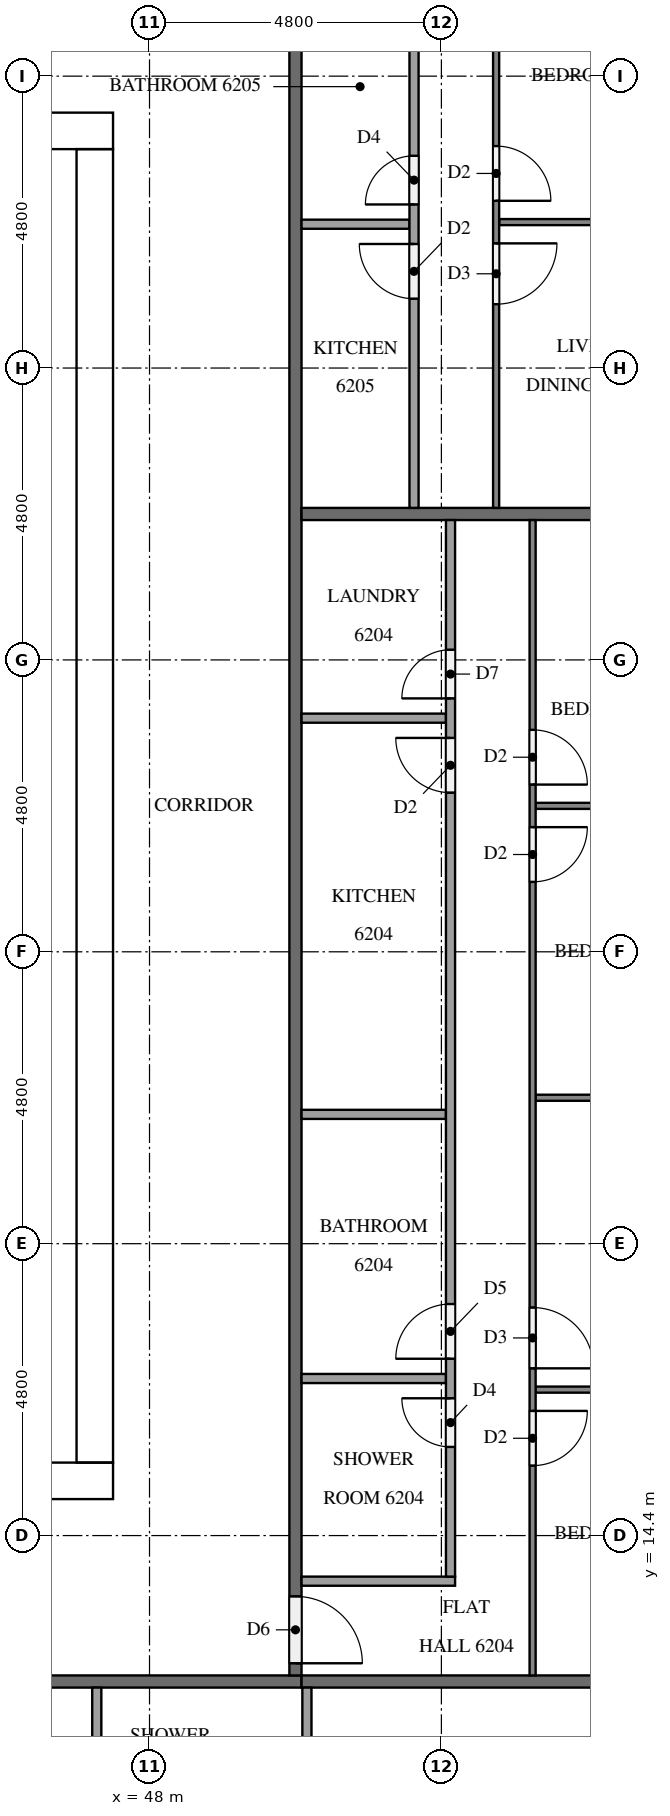
"""IFC4 building model, lengths in metres.
Left out: names, types, materials, properties, quantities, classifications, styles, units other than length and angle.
Written with IfcOpenShell. Run it as: python <this file> out.ifc"""

import sys

from ifc_helpers import new_model, si_unit, direction, frame, frame_2d, origin, place, context, subcontext, project, spatial, rectangle, extrude, element, fill, save


model = new_model("IFC4")
c1 = context("Model", 3, precision=1e-05, world=origin(), true_north=direction((0.0, 1.0)))
c2 = subcontext(c1, "Body", "Model", "MODEL_VIEW")
j1 = project(units=[si_unit("LENGTHUNIT", "METRE"), si_unit("PLANEANGLEUNIT", "RADIAN")], contexts=[c1])
p1 = place(None, origin())
s1 = spatial("IfcSite", under=j1, at=p1, CompositionType="ELEMENT")
p2 = place(p1, origin())
s2 = spatial("IfcBuilding", under=s1, at=p2, CompositionType="ELEMENT")
p3 = place(p2, frame((0.0, 0.0, 238.7)))
s3 = spatial("IfcBuildingStorey", under=s2, at=p3, CompositionType="ELEMENT", Elevation=238.7)
p4 = place(p3, frame((15.0, 15.3, 0.0), z_axis=(0.0, 0.0, 1.0), x_axis=(1.0, 0.0, 0.0)))
e1 = element("IfcWall", 1, at=p4, inside=s3, PredefinedType="SHEAR", context=c2, shape_type="SweptSolid", body=[
    extrude(rectangle(XDim=32.4, YDim=0.6, at=frame_2d((16.2, 0.0))), origin(), (0.0, 0.0, 1.0), 3.2),
])
p5 = place(p4, frame((15.3, 0.0, 0.0)))
e2 = element("IfcOpeningElement", 2, at=p5, cuts=e1, PredefinedType="OPENING", context=c2, shape_type="SweptSolid", body=[
    extrude(rectangle(XDim=1.8, YDim=2.1, at=frame_2d((0.9, 1.05))), frame((0.0, 0.31, 0.0), z_axis=(0.0, -1.0, 0.0), x_axis=(1.0, 0.0, 0.0)), (0.0, 0.0, 1.0), 0.62),
])
p6 = place(p3, frame((15.0, 37.5, 0.0), z_axis=(0.0, 0.0, 1.0), x_axis=(1.0, 0.0, 0.0)))
e3 = element("IfcWall", 3, at=p6, inside=s3, PredefinedType="SHEAR", context=c2, shape_type="SweptSolid", body=[
    extrude(rectangle(XDim=32.4, YDim=0.6, at=frame_2d((16.2, 0.0))), origin(), (0.0, 0.0, 1.0), 3.2),
])
p7 = place(p6, frame((15.3, 0.0, 0.0)))
e4 = element("IfcOpeningElement", 4, at=p7, cuts=e3, PredefinedType="OPENING", context=c2, shape_type="SweptSolid", body=[
    extrude(rectangle(XDim=1.8, YDim=2.1, at=frame_2d((0.9, 1.05))), frame((0.0, 0.31, 0.0), z_axis=(0.0, -1.0, 0.0), x_axis=(1.0, 0.0, 0.0)), (0.0, 0.0, 1.0), 0.62),
])
p8 = place(p6, frame((1.25, 0.0, 0.0)))
e5 = element("IfcOpeningElement", 5, at=p8, cuts=e3, PredefinedType="OPENING", context=c2, shape_type="SweptSolid", body=[
    extrude(rectangle(XDim=1.0, YDim=2.1, at=frame_2d((0.5, 1.05))), frame((0.0, 0.31, 0.0), z_axis=(0.0, -1.0, 0.0), x_axis=(1.0, 0.0, 0.0)), (0.0, 0.0, 1.0), 0.62),
])
p9 = place(p6, frame((4.988, 0.0, 0.0)))
e6 = element("IfcOpeningElement", 6, at=p9, cuts=e3, PredefinedType="OPENING", context=c2, shape_type="SweptSolid", body=[
    extrude(rectangle(XDim=1.0, YDim=2.1, at=frame_2d((0.5, 1.05))), frame((0.0, 0.31, 0.0), z_axis=(0.0, -1.0, 0.0), x_axis=(1.0, 0.0, 0.0)), (0.0, 0.0, 1.0), 0.62),
])
p10 = place(p3, frame((47.1, 15.6, 0.0), z_axis=(0.0, 0.0, 1.0), x_axis=(0.0, 1.0, 0.0)))
e7 = element("IfcWall", 7, at=p10, inside=s3, PredefinedType="SHEAR", context=c2, shape_type="SweptSolid", body=[
    extrude(rectangle(XDim=21.6, YDim=0.6, at=frame_2d((10.8, 0.0))), origin(), (0.0, 0.0, 1.0), 3.2),
])
p11 = place(p10, frame((10.5, 0.0, 0.0)))
e8 = element("IfcOpeningElement", 8, at=p11, cuts=e7, PredefinedType="OPENING", context=c2, shape_type="SweptSolid", body=[
    extrude(rectangle(XDim=1.2, YDim=2.1, at=frame_2d((0.6, 1.05))), frame((0.0, 0.31, 0.0), z_axis=(0.0, -1.0, 0.0), x_axis=(1.0, 0.0, 0.0)), (0.0, 0.0, 1.0), 0.62),
])
p12 = place(p3, frame((50.5, 12.0, 0.0), z_axis=(0.0, 0.0, 1.0), x_axis=(-1.0, 0.0, 0.0)))
e9 = element("IfcWall", 9, at=p12, inside=s3, PredefinedType="PARTITIONING", context=c2, shape_type="SweptSolid", body=[
    extrude(rectangle(XDim=38.6, YDim=0.2, at=frame_2d((19.3, 0.0))), origin(), (0.0, 0.0, 1.0), 3.2),
])
p13 = place(p12, frame((37.1, 0.0, 0.0)))
e10 = element("IfcOpeningElement", 10, at=p13, cuts=e9, PredefinedType="OPENING", context=c2, shape_type="SweptSolid", body=[
    extrude(rectangle(XDim=1.1, YDim=2.1, at=frame_2d((0.55, 1.05))), frame((0.0, 0.11, 0.0), z_axis=(0.0, -1.0, 0.0), x_axis=(1.0, 0.0, 0.0)), (0.0, 0.0, 1.0), 0.22),
])
p14 = place(p12, frame((17.95, 0.0, 0.0)))
e11 = element("IfcOpeningElement", 11, at=p14, cuts=e9, PredefinedType="OPENING", context=c2, shape_type="SweptSolid", body=[
    extrude(rectangle(XDim=1.0, YDim=2.1, at=frame_2d((0.5, 1.05))), frame((0.0, 0.11, 0.0), z_axis=(0.0, -1.0, 0.0), x_axis=(1.0, 0.0, 0.0)), (0.0, 0.0, 1.0), 0.22),
])
p15 = place(p12, frame((8.35, 0.0, 0.0)))
e12 = element("IfcOpeningElement", 12, at=p15, cuts=e9, PredefinedType="OPENING", context=c2, shape_type="SweptSolid", body=[
    extrude(rectangle(XDim=1.0, YDim=2.1, at=frame_2d((0.5, 1.05))), frame((0.0, 0.11, 0.0), z_axis=(0.0, -1.0, 0.0), x_axis=(1.0, 0.0, 0.0)), (0.0, 0.0, 1.0), 0.22),
])
p16 = place(p3, frame((50.4, 40.7, 0.0), z_axis=(0.0, 0.0, 1.0), x_axis=(0.0, -1.0, 0.0)))
e13 = element("IfcWall", 13, at=p16, inside=s3, PredefinedType="PARTITIONING", context=c2, shape_type="SweptSolid", body=[
    extrude(rectangle(XDim=28.6, YDim=0.2, at=frame_2d((14.3, 0.0))), origin(), (0.0, 0.0, 1.0), 3.2),
])
p17 = place(p16, frame((27.3, 0.0, 0.0)))
e14 = element("IfcOpeningElement", 14, at=p17, cuts=e13, PredefinedType="OPENING", context=c2, shape_type="SweptSolid", body=[
    extrude(rectangle(XDim=1.1, YDim=2.1, at=frame_2d((0.55, 1.05))), frame((0.0, 0.11, 0.0), z_axis=(0.0, -1.0, 0.0), x_axis=(1.0, 0.0, 0.0)), (0.0, 0.0, 1.0), 0.22),
])
p18 = place(p16, frame((0.25, 0.0, 0.0)))
e15 = element("IfcOpeningElement", 15, at=p18, cuts=e13, PredefinedType="OPENING", context=c2, shape_type="SweptSolid", body=[
    extrude(rectangle(XDim=1.0, YDim=2.1, at=frame_2d((0.5, 1.05))), frame((0.0, 0.11, 0.0), z_axis=(0.0, -1.0, 0.0), x_axis=(1.0, 0.0, 0.0)), (0.0, 0.0, 1.0), 0.22),
])
for number, where, z_axis, x_axis in (
    (16, (50.5, 12.0, 0.0), (0.0, 0.0, 1.0), (1.0, 0.0, 0.0)),
    (17, (50.5, 31.2, 0.0), (0.0, 0.0, 1.0), (1.0, 0.0, 0.0)),
):
    element("IfcWall", number, at=place(p3, frame(where, z_axis=z_axis, x_axis=x_axis)), inside=s3, PredefinedType="PARTITIONING", context=c2, shape_type="SweptSolid", body=[
        extrude(rectangle(XDim=7.0, YDim=0.2, at=frame_2d((3.5, 0.0))), origin(), (0.0, 0.0, 1.0), 3.2),
    ])
for number, where, z_axis, x_axis in (
    (18, (47.133, 11.9, 0.0), (0.0, 0.0, 1.0), (0.0, -1.0, 0.0)),
    (19, (50.588, 11.9, 0.0), (0.0, 0.0, 1.0), (0.0, -1.0, 0.0)),
):
    element("IfcWall", number, at=place(p3, frame(where, z_axis=z_axis, x_axis=x_axis)), inside=s3, PredefinedType="PARTITIONING", context=c2, shape_type="SweptSolid", body=[
        extrude(rectangle(XDim=2.075, YDim=0.15, at=frame_2d((1.038, 0.0))), origin(), (0.0, 0.0, 1.0), 3.2),
    ])
for number, where, z_axis, x_axis in (
    (20, (54.35, 16.8, 0.0), (0.0, 0.0, 1.0), (1.0, 0.0, 0.0)),
    (21, (54.35, 21.6, 0.0), (0.0, 0.0, 1.0), (1.0, 0.0, 0.0)),
    (22, (54.35, 26.4, 0.0), (0.0, 0.0, 1.0), (1.0, 0.0, 0.0)),
):
    element("IfcWall", number, at=place(p3, frame(where, z_axis=z_axis, x_axis=x_axis)), inside=s3, PredefinedType="PARTITIONING", context=c2, shape_type="SweptSolid", body=[
        extrude(rectangle(XDim=3.15, YDim=0.1, at=frame_2d((1.575, 0.0))), origin(), (0.0, 0.0, 1.0), 3.2),
    ])
p19 = place(p3, frame((54.3, 31.1, 0.0), z_axis=(0.0, 0.0, 1.0), x_axis=(0.0, -1.0, 0.0)))
e23 = element("IfcWall", 23, at=p19, inside=s3, PredefinedType="PARTITIONING", context=c2, shape_type="SweptSolid", body=[
    extrude(rectangle(XDim=19.0, YDim=0.1, at=frame_2d((9.5, 0.0))), origin(), (0.0, 0.0, 1.0), 3.2),
])
p20 = place(p19, frame((14.65, 0.0, 0.0)))
e24 = element("IfcOpeningElement", 24, at=p20, cuts=e23, PredefinedType="OPENING", context=c2, shape_type="SweptSolid", body=[
    extrude(rectangle(XDim=0.9, YDim=2.1, at=frame_2d((0.45, 1.05))), frame((0.0, 0.06, 0.0), z_axis=(0.0, -1.0, 0.0), x_axis=(1.0, 0.0, 0.0)), (0.0, 0.0, 1.0), 0.12),
])
p21 = place(p19, frame((12.95, 0.0, 0.0)))
e25 = element("IfcOpeningElement", 25, at=p21, cuts=e23, PredefinedType="OPENING", context=c2, shape_type="SweptSolid", body=[
    extrude(rectangle(XDim=1.0, YDim=2.1, at=frame_2d((0.5, 1.05))), frame((0.0, 0.06, 0.0), z_axis=(0.0, -1.0, 0.0), x_axis=(1.0, 0.0, 0.0)), (0.0, 0.0, 1.0), 0.12),
])
p22 = place(p19, frame((5.05, 0.0, 0.0)))
e26 = element("IfcOpeningElement", 26, at=p22, cuts=e23, PredefinedType="OPENING", context=c2, shape_type="SweptSolid", body=[
    extrude(rectangle(XDim=0.9, YDim=2.1, at=frame_2d((0.45, 1.05))), frame((0.0, 0.06, 0.0), z_axis=(0.0, -1.0, 0.0), x_axis=(1.0, 0.0, 0.0)), (0.0, 0.0, 1.0), 0.12),
])
p23 = place(p19, frame((3.45, 0.0, 0.0)))
e27 = element("IfcOpeningElement", 27, at=p23, cuts=e23, PredefinedType="OPENING", context=c2, shape_type="SweptSolid", body=[
    extrude(rectangle(XDim=0.9, YDim=2.1, at=frame_2d((0.45, 1.05))), frame((0.0, 0.06, 0.0), z_axis=(0.0, -1.0, 0.0), x_axis=(1.0, 0.0, 0.0)), (0.0, 0.0, 1.0), 0.12),
])
for number, where, z_axis, x_axis in (
    (28, (50.5, 16.983, 0.0), (0.0, 0.0, 1.0), (1.0, 0.0, 0.0)),
    (29, (50.5, 21.327, 0.0), (0.0, 0.0, 1.0), (1.0, 0.0, 0.0)),
    (30, (50.5, 27.842, 0.0), (0.0, 0.0, 1.0), (1.0, 0.0, 0.0)),
):
    element("IfcWall", number, at=place(p3, frame(where, z_axis=z_axis, x_axis=x_axis)), inside=s3, PredefinedType="PARTITIONING", context=c2, shape_type="SweptSolid", body=[
        extrude(rectangle(XDim=2.375, YDim=0.15, at=frame_2d((1.188, 0.0))), origin(), (0.0, 0.0, 1.0), 3.2),
    ])
p24 = place(p3, frame((50.5, 13.65, 0.0), z_axis=(0.0, 0.0, 1.0), x_axis=(1.0, 0.0, 0.0)))
e31 = element("IfcWall", 31, at=p24, inside=s3, PredefinedType="PARTITIONING", context=c2, shape_type="SweptSolid", body=[
    extrude(rectangle(XDim=2.525, YDim=0.15, at=frame_2d((1.262, 0.0))), origin(), (0.0, 0.0, 1.0), 3.2),
])
p25 = place(p3, frame((52.95, 13.725, 0.0), z_axis=(0.0, 0.0, 1.0), x_axis=(0.0, 1.0, 0.0)))
e32 = element("IfcWall", 32, at=p25, inside=s3, PredefinedType="PARTITIONING", context=c2, shape_type="SweptSolid", body=[
    extrude(rectangle(XDim=17.375, YDim=0.15, at=frame_2d((8.688, 0.0))), origin(), (0.0, 0.0, 1.0), 3.2),
])
p26 = place(p25, frame((2.133, 0.0, 0.0)))
e33 = element("IfcOpeningElement", 33, at=p26, cuts=e32, PredefinedType="OPENING", context=c2, shape_type="SweptSolid", body=[
    extrude(rectangle(XDim=0.8, YDim=2.1, at=frame_2d((0.4, 1.05))), frame((0.0, 0.085, 0.0), z_axis=(0.0, -1.0, 0.0), x_axis=(1.0, 0.0, 0.0)), (0.0, 0.0, 1.0), 0.17),
])
p27 = place(p25, frame((3.583, 0.0, 0.0)))
e34 = element("IfcOpeningElement", 34, at=p27, cuts=e32, PredefinedType="OPENING", context=c2, shape_type="SweptSolid", body=[
    extrude(rectangle(XDim=0.9, YDim=2.1, at=frame_2d((0.45, 1.05))), frame((0.0, 0.085, 0.0), z_axis=(0.0, -1.0, 0.0), x_axis=(1.0, 0.0, 0.0)), (0.0, 0.0, 1.0), 0.17),
])
p28 = place(p25, frame((12.892, 0.0, 0.0)))
e35 = element("IfcOpeningElement", 35, at=p28, cuts=e32, PredefinedType="OPENING", context=c2, shape_type="SweptSolid", body=[
    extrude(rectangle(XDim=0.9, YDim=2.1, at=frame_2d((0.45, 1.05))), frame((0.0, 0.085, 0.0), z_axis=(0.0, -1.0, 0.0), x_axis=(1.0, 0.0, 0.0)), (0.0, 0.0, 1.0), 0.17),
])
p29 = place(p25, frame((14.442, 0.0, 0.0)))
e36 = element("IfcOpeningElement", 36, at=p29, cuts=e32, PredefinedType="OPENING", context=c2, shape_type="SweptSolid", body=[
    extrude(rectangle(XDim=0.8, YDim=2.1, at=frame_2d((0.4, 1.05))), frame((0.0, 0.085, 0.0), z_axis=(0.0, -1.0, 0.0), x_axis=(1.0, 0.0, 0.0)), (0.0, 0.0, 1.0), 0.17),
])
p30 = place(p3, frame((53.75, 36.0, 0.0), z_axis=(0.0, 0.0, 1.0), x_axis=(1.0, 0.0, 0.0)))
e37 = element("IfcWall", 37, at=p30, inside=s3, PredefinedType="PARTITIONING", context=c2, shape_type="SweptSolid", body=[
    extrude(rectangle(XDim=3.75, YDim=0.1, at=frame_2d((1.875, 0.0))), origin(), (0.0, 0.0, 1.0), 3.2),
])
p31 = place(p3, frame((53.7, 40.7, 0.0), z_axis=(0.0, 0.0, 1.0), x_axis=(0.0, -1.0, 0.0)))
e38 = element("IfcWall", 38, at=p31, inside=s3, PredefinedType="PARTITIONING", context=c2, shape_type="SweptSolid", body=[
    extrude(rectangle(XDim=9.4, YDim=0.1, at=frame_2d((4.7, 0.0))), origin(), (0.0, 0.0, 1.0), 3.2),
])
p32 = place(p31, frame((3.45, 0.0, 0.0)))
e39 = element("IfcOpeningElement", 39, at=p32, cuts=e38, PredefinedType="OPENING", context=c2, shape_type="SweptSolid", body=[
    extrude(rectangle(XDim=0.9, YDim=2.1, at=frame_2d((0.45, 1.05))), frame((0.0, 0.06, 0.0), z_axis=(0.0, -1.0, 0.0), x_axis=(1.0, 0.0, 0.0)), (0.0, 0.0, 1.0), 0.12),
])
p33 = place(p31, frame((5.05, 0.0, 0.0)))
e40 = element("IfcOpeningElement", 40, at=p33, cuts=e38, PredefinedType="OPENING", context=c2, shape_type="SweptSolid", body=[
    extrude(rectangle(XDim=1.0, YDim=2.1, at=frame_2d((0.5, 1.05))), frame((0.0, 0.06, 0.0), z_axis=(0.0, -1.0, 0.0), x_axis=(1.0, 0.0, 0.0)), (0.0, 0.0, 1.0), 0.12),
])
p34 = place(p3, frame((50.5, 35.965, 0.0), z_axis=(0.0, 0.0, 1.0), x_axis=(1.0, 0.0, 0.0)))
e41 = element("IfcWall", 41, at=p34, inside=s3, PredefinedType="PARTITIONING", context=c2, shape_type="SweptSolid", body=[
    extrude(rectangle(XDim=1.775, YDim=0.15, at=frame_2d((0.887, 0.0))), origin(), (0.0, 0.0, 1.0), 3.2),
])
p35 = place(p3, frame((52.35, 31.3, 0.0), z_axis=(0.0, 0.0, 1.0), x_axis=(0.0, 1.0, 0.0)))
e42 = element("IfcWall", 42, at=p35, inside=s3, PredefinedType="PARTITIONING", context=c2, shape_type="SweptSolid", body=[
    extrude(rectangle(XDim=7.775, YDim=0.15, at=frame_2d((3.887, 0.0))), origin(), (0.0, 0.0, 1.0), 3.2),
])
p36 = place(p35, frame((4.99, 0.0, 0.0)))
e43 = element("IfcOpeningElement", 43, at=p36, cuts=e42, PredefinedType="OPENING", context=c2, shape_type="SweptSolid", body=[
    extrude(rectangle(XDim=0.8, YDim=2.1, at=frame_2d((0.4, 1.05))), frame((0.0, 0.085, 0.0), z_axis=(0.0, -1.0, 0.0), x_axis=(1.0, 0.0, 0.0)), (0.0, 0.0, 1.0), 0.17),
])
p37 = place(p35, frame((3.44, 0.0, 0.0)))
e44 = element("IfcOpeningElement", 44, at=p37, cuts=e42, PredefinedType="OPENING", context=c2, shape_type="SweptSolid", body=[
    extrude(rectangle(XDim=0.9, YDim=2.1, at=frame_2d((0.45, 1.05))), frame((0.0, 0.085, 0.0), z_axis=(0.0, -1.0, 0.0), x_axis=(1.0, 0.0, 0.0)), (0.0, 0.0, 1.0), 0.17),
])
p38 = place(p11, origin())
e45 = element("IfcDoor", 45, at=p38, inside=s3, OperationType="SINGLE_SWING_RIGHT", PredefinedType="DOOR", context=c2, shape_type="SweptSolid", body=[
    extrude(rectangle(XDim=1.2, YDim=2.1, at=frame_2d((0.6, 1.05))), frame((0.0, 0.025, 0.0), z_axis=(0.0, -1.0, 0.0), x_axis=(1.0, 0.0, 0.0)), (0.0, 0.0, 1.0), 0.05),
])
fill(e8, e45)
p39 = place(p17, origin())
e46 = element("IfcDoor", 46, at=p39, inside=s3, OperationType="SINGLE_SWING_RIGHT", PredefinedType="DOOR", context=c2, shape_type="SweptSolid", body=[
    extrude(rectangle(XDim=1.1, YDim=2.1, at=frame_2d((0.55, 1.05))), frame((0.0, 0.025, 0.0), z_axis=(0.0, -1.0, 0.0), x_axis=(1.0, 0.0, 0.0)), (0.0, 0.0, 1.0), 0.05),
])
fill(e14, e46)
p40 = place(p20, origin())
e47 = element("IfcDoor", 47, at=p40, inside=s3, OperationType="SINGLE_SWING_LEFT", PredefinedType="DOOR", context=c2, shape_type="SweptSolid", body=[
    extrude(rectangle(XDim=0.9, YDim=2.1, at=frame_2d((0.45, 1.05))), frame((0.0, 0.025, 0.0), z_axis=(0.0, -1.0, 0.0), x_axis=(1.0, 0.0, 0.0)), (0.0, 0.0, 1.0), 0.05),
])
fill(e24, e47)
p41 = place(p21, origin())
e48 = element("IfcDoor", 48, at=p41, inside=s3, OperationType="SINGLE_SWING_RIGHT", PredefinedType="DOOR", context=c2, shape_type="SweptSolid", body=[
    extrude(rectangle(XDim=1.0, YDim=2.1, at=frame_2d((0.5, 1.05))), frame((0.0, 0.025, 0.0), z_axis=(0.0, -1.0, 0.0), x_axis=(1.0, 0.0, 0.0)), (0.0, 0.0, 1.0), 0.05),
])
fill(e25, e48)
p42 = place(p22, origin())
e49 = element("IfcDoor", 49, at=p42, inside=s3, OperationType="SINGLE_SWING_LEFT", PredefinedType="DOOR", context=c2, shape_type="SweptSolid", body=[
    extrude(rectangle(XDim=0.9, YDim=2.1, at=frame_2d((0.45, 1.05))), frame((0.0, 0.025, 0.0), z_axis=(0.0, -1.0, 0.0), x_axis=(1.0, 0.0, 0.0)), (0.0, 0.0, 1.0), 0.05),
])
fill(e26, e49)
p43 = place(p23, origin())
e50 = element("IfcDoor", 50, at=p43, inside=s3, OperationType="SINGLE_SWING_RIGHT", PredefinedType="DOOR", context=c2, shape_type="SweptSolid", body=[
    extrude(rectangle(XDim=0.9, YDim=2.1, at=frame_2d((0.45, 1.05))), frame((0.0, 0.025, 0.0), z_axis=(0.0, -1.0, 0.0), x_axis=(1.0, 0.0, 0.0)), (0.0, 0.0, 1.0), 0.05),
])
fill(e27, e50)
p44 = place(p26, origin())
e51 = element("IfcDoor", 51, at=p44, inside=s3, OperationType="SINGLE_SWING_RIGHT", PredefinedType="DOOR", context=c2, shape_type="SweptSolid", body=[
    extrude(rectangle(XDim=0.8, YDim=2.1, at=frame_2d((0.4, 1.05))), frame((0.0, 0.025, 0.0), z_axis=(0.0, -1.0, 0.0), x_axis=(1.0, 0.0, 0.0)), (0.0, 0.0, 1.0), 0.05),
])
fill(e33, e51)
p45 = place(p27, origin())
e52 = element("IfcDoor", 52, at=p45, inside=s3, OperationType="SINGLE_SWING_LEFT", PredefinedType="DOOR", context=c2, shape_type="SweptSolid", body=[
    extrude(rectangle(XDim=0.9, YDim=2.1, at=frame_2d((0.45, 1.05))), frame((0.0, 0.025, 0.0), z_axis=(0.0, -1.0, 0.0), x_axis=(1.0, 0.0, 0.0)), (0.0, 0.0, 1.0), 0.05),
])
fill(e34, e52)
p46 = place(p28, origin())
e53 = element("IfcDoor", 53, at=p46, inside=s3, OperationType="SINGLE_SWING_RIGHT", PredefinedType="DOOR", context=c2, shape_type="SweptSolid", body=[
    extrude(rectangle(XDim=0.9, YDim=2.1, at=frame_2d((0.45, 1.05))), frame((0.0, 0.025, 0.0), z_axis=(0.0, -1.0, 0.0), x_axis=(1.0, 0.0, 0.0)), (0.0, 0.0, 1.0), 0.05),
])
fill(e35, e53)
p47 = place(p29, origin())
e54 = element("IfcDoor", 54, at=p47, inside=s3, OperationType="SINGLE_SWING_LEFT", PredefinedType="DOOR", context=c2, shape_type="SweptSolid", body=[
    extrude(rectangle(XDim=0.8, YDim=2.1, at=frame_2d((0.4, 1.05))), frame((0.0, 0.025, 0.0), z_axis=(0.0, -1.0, 0.0), x_axis=(1.0, 0.0, 0.0)), (0.0, 0.0, 1.0), 0.05),
])
fill(e36, e54)
p48 = place(p32, origin())
e55 = element("IfcDoor", 55, at=p48, inside=s3, OperationType="SINGLE_SWING_RIGHT", PredefinedType="DOOR", context=c2, shape_type="SweptSolid", body=[
    extrude(rectangle(XDim=0.9, YDim=2.1, at=frame_2d((0.45, 1.05))), frame((0.0, 0.025, 0.0), z_axis=(0.0, -1.0, 0.0), x_axis=(1.0, 0.0, 0.0)), (0.0, 0.0, 1.0), 0.05),
])
fill(e39, e55)
p49 = place(p33, origin())
e56 = element("IfcDoor", 56, at=p49, inside=s3, OperationType="SINGLE_SWING_LEFT", PredefinedType="DOOR", context=c2, shape_type="SweptSolid", body=[
    extrude(rectangle(XDim=1.0, YDim=2.1, at=frame_2d((0.5, 1.05))), frame((0.0, 0.025, 0.0), z_axis=(0.0, -1.0, 0.0), x_axis=(1.0, 0.0, 0.0)), (0.0, 0.0, 1.0), 0.05),
])
fill(e40, e56)
p50 = place(p36, origin())
e57 = element("IfcDoor", 57, at=p50, inside=s3, OperationType="SINGLE_SWING_LEFT", PredefinedType="DOOR", context=c2, shape_type="SweptSolid", body=[
    extrude(rectangle(XDim=0.8, YDim=2.1, at=frame_2d((0.4, 1.05))), frame((0.0, 0.025, 0.0), z_axis=(0.0, -1.0, 0.0), x_axis=(1.0, 0.0, 0.0)), (0.0, 0.0, 1.0), 0.05),
])
fill(e43, e57)
p51 = place(p37, origin())
e58 = element("IfcDoor", 58, at=p51, inside=s3, OperationType="SINGLE_SWING_RIGHT", PredefinedType="DOOR", context=c2, shape_type="SweptSolid", body=[
    extrude(rectangle(XDim=0.9, YDim=2.1, at=frame_2d((0.45, 1.05))), frame((0.0, 0.025, 0.0), z_axis=(0.0, -1.0, 0.0), x_axis=(1.0, 0.0, 0.0)), (0.0, 0.0, 1.0), 0.05),
])
fill(e44, e58)
save(model, sys.argv[1])
